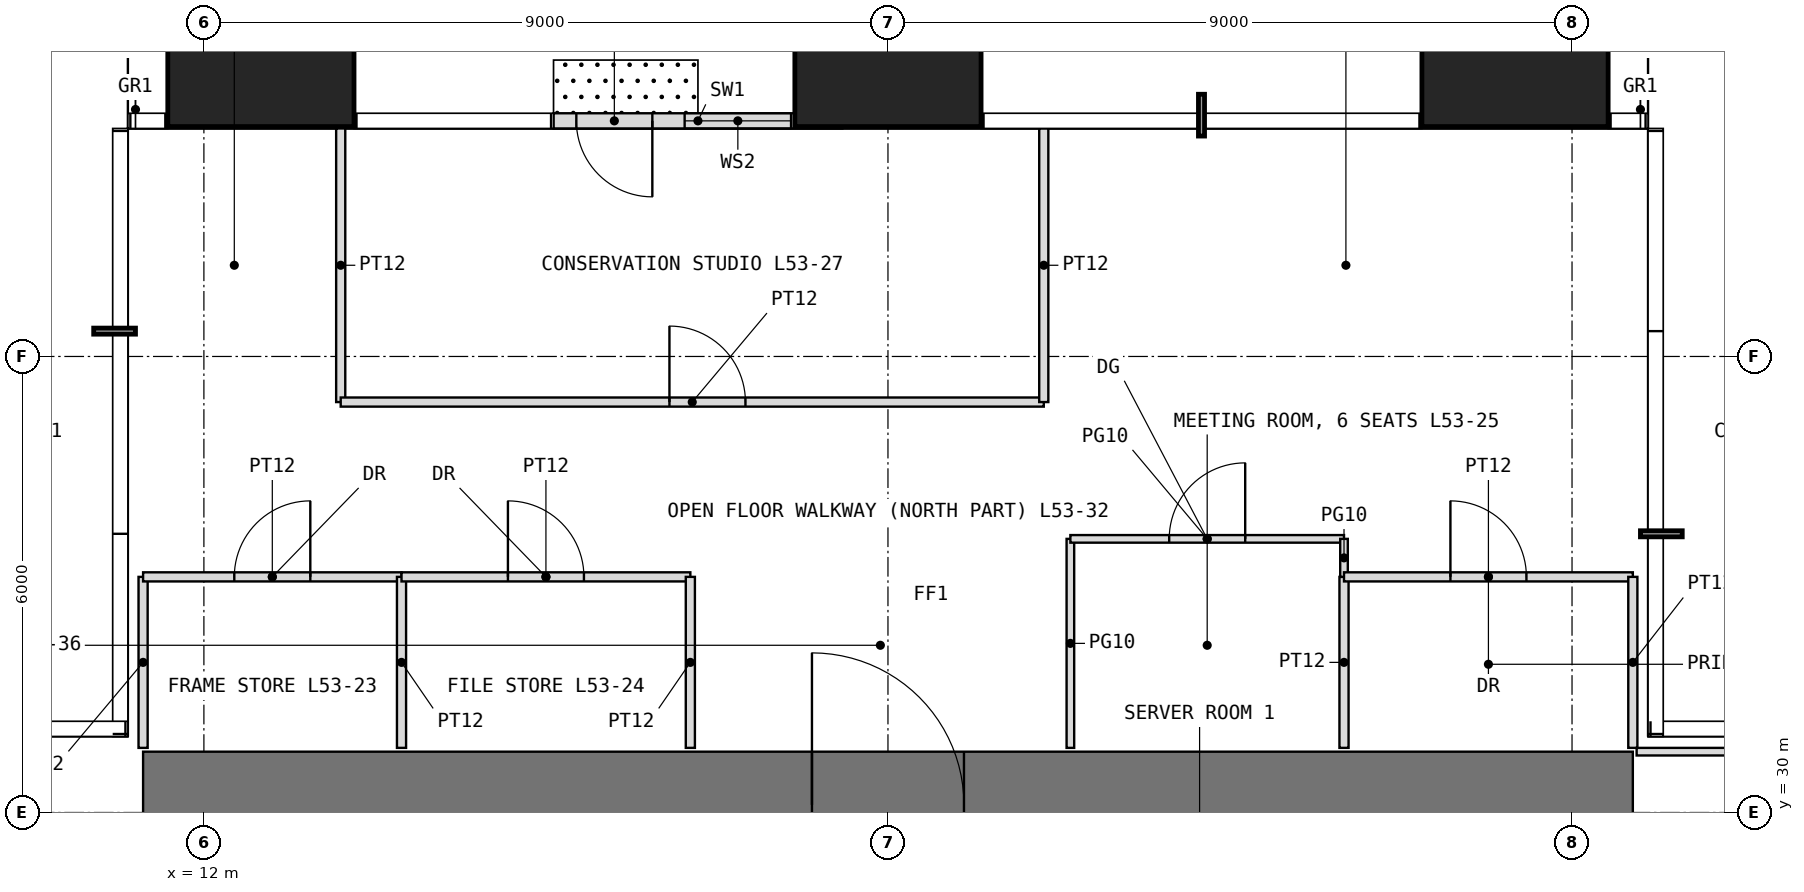
"""IFC4 building model, lengths in metres.
Left out: names, types, materials, properties, quantities, classifications, styles, units other than length and angle.
Written with IfcOpenShell. Run it as: python <this file> out.ifc"""

import sys

from ifc_helpers import new_model, si_unit, direction, frame, frame_2d, origin, origin_2d, place, context, subcontext, project, spatial, rectangle, extrude, element, fill, save


model = new_model("IFC4")
c1 = context("Model", 3, precision=1e-05, world=origin(), true_north=direction((0.0, 1.0)))
c2 = subcontext(c1, "Body", "Model", "MODEL_VIEW")
j1 = project(units=[si_unit("LENGTHUNIT", "METRE"), si_unit("PLANEANGLEUNIT", "RADIAN")], contexts=[c1])
p1 = place(None, origin())
s1 = spatial("IfcSite", under=j1, at=p1, CompositionType="ELEMENT")
p2 = place(p1, origin())
s2 = spatial("IfcBuilding", under=s1, at=p2, CompositionType="ELEMENT")
p3 = place(p2, frame((0.0, 0.0, 222.5)))
s3 = spatial("IfcBuildingStorey", under=s2, at=p3, CompositionType="ELEMENT", Elevation=222.5)
for number, where, z_axis, x_axis in (
    (1, (12.75, 40.25, 0.0), (0.0, 0.0, 1.0), (1.0, 0.0, 0.0)),
    (2, (21.0, 40.25, 0.0), (0.0, 0.0, 1.0), (1.0, 0.0, 0.0)),
    (3, (29.25, 40.25, 0.0), (0.0, 0.0, 1.0), (1.0, 0.0, 0.0)),
):
    element("IfcColumn", number, at=place(p3, frame(where, z_axis=z_axis, x_axis=x_axis)), inside=s3, PredefinedType="COLUMN", context=c2, shape_type="SweptSolid", body=[
        extrude(rectangle(XDim=2.45, YDim=2.45, at=origin_2d()), origin(), (0.0, 0.0, 1.0), 4.0),
    ])
p4 = place(p3, frame((20.4, 39.1, 0.0), z_axis=(0.0, 0.0, 1.0), x_axis=(-1.0, 0.0, 0.0)))
e4 = element("IfcWall", 4, at=p4, inside=s3, PredefinedType="USERDEFINED", context=c2, shape_type="SweptSolid", body=[
    extrude(rectangle(XDim=3.8, YDim=0.2, at=frame_2d((1.9, 0.0))), origin(), (0.0, 0.0, 1.0), 3.75),
])
p5 = place(p4, frame((2.5, 0.0, 0.0)))
e5 = element("IfcOpeningElement", 5, at=p5, cuts=e4, PredefinedType="OPENING", context=c2, shape_type="SweptSolid", body=[
    extrude(rectangle(XDim=1.0, YDim=2.4, at=frame_2d((0.5, 1.2))), frame((0.0, 0.11, 0.0), z_axis=(0.0, -1.0, 0.0), x_axis=(1.0, 0.0, 0.0)), (0.0, 0.0, 1.0), 0.22),
])
p6 = place(p4, frame((0.675, 0.0, 0.3)))
e6 = element("IfcOpeningElement", 6, at=p6, cuts=e4, PredefinedType="OPENING", context=c2, shape_type="SweptSolid", body=[
    extrude(rectangle(XDim=1.4, YDim=2.7, at=frame_2d((0.7, 1.35))), frame((0.0, 0.11, 0.0), z_axis=(0.0, -1.0, 0.0), x_axis=(1.0, 0.0, 0.0)), (0.0, 0.0, 1.0), 0.22),
])
p7 = place(p3, frame((11.2, 30.1, -0.05), z_axis=(0.0, 0.0, 1.0), x_axis=(1.0, 0.0, 0.0)))
e7 = element("IfcWall", 7, at=p7, inside=s3, PredefinedType="SHEAR", context=c2, shape_type="SweptSolid", body=[
    extrude(rectangle(XDim=19.6, YDim=1.4, at=frame_2d((9.8, 0.0))), origin(), (0.0, 0.0, 1.0), 4.0),
])
p8 = place(p7, frame((8.8, 0.0, 0.05)))
e8 = element("IfcOpeningElement", 8, at=p8, cuts=e7, PredefinedType="OPENING", context=c2, shape_type="SweptSolid", body=[
    extrude(rectangle(XDim=2.0, YDim=2.2, at=frame_2d((1.0, 1.1))), frame((0.0, 0.71, 0.0), z_axis=(0.0, -1.0, 0.0), x_axis=(1.0, 0.0, 0.0)), (0.0, 0.0, 1.0), 1.42),
])
p9 = place(p3, frame((11.2, 30.85, 0.0), z_axis=(0.0, 0.0, 1.0), x_axis=(0.0, 1.0, 0.0)))
e9 = element("IfcWall", 9, at=p9, inside=s3, PredefinedType="PARTITIONING", context=c2, shape_type="SweptSolid", body=[
    extrude(rectangle(XDim=2.25, YDim=0.12, at=frame_2d((1.125, 0.0))), origin(), (0.0, 0.0, 1.0), 3.75),
])
p10 = place(p3, frame((11.2, 33.1, 0.0), z_axis=(0.0, 0.0, 1.0), x_axis=(1.0, 0.0, 0.0)))
e10 = element("IfcWall", 10, at=p10, inside=s3, PredefinedType="PARTITIONING", context=c2, shape_type="SweptSolid", body=[
    extrude(rectangle(XDim=3.4, YDim=0.12, at=frame_2d((1.7, 0.0))), origin(), (0.0, 0.0, 1.0), 3.75),
])
p11 = place(p10, frame((1.2, 0.0, 0.0)))
e11 = element("IfcOpeningElement", 11, at=p11, cuts=e10, PredefinedType="OPENING", context=c2, shape_type="SweptSolid", body=[
    extrude(rectangle(XDim=1.0, YDim=2.2, at=frame_2d((0.5, 1.1))), frame((0.0, 0.07, 0.0), z_axis=(0.0, -1.0, 0.0), x_axis=(1.0, 0.0, 0.0)), (0.0, 0.0, 1.0), 0.14),
])
p12 = place(p3, frame((13.8, 35.4, 0.0), z_axis=(0.0, 0.0, 1.0), x_axis=(0.0, 1.0, 0.0)))
e12 = element("IfcWall", 12, at=p12, inside=s3, PredefinedType="PARTITIONING", context=c2, shape_type="SweptSolid", body=[
    extrude(rectangle(XDim=3.6, YDim=0.12, at=frame_2d((1.8, 0.0))), origin(), (0.0, 0.0, 1.0), 3.75),
])
p13 = place(p3, frame((13.8, 35.4, 0.0), z_axis=(0.0, 0.0, 1.0), x_axis=(1.0, 0.0, 0.0)))
e13 = element("IfcWall", 13, at=p13, inside=s3, PredefinedType="PARTITIONING", context=c2, shape_type="SweptSolid", body=[
    extrude(rectangle(XDim=9.25, YDim=0.12, at=frame_2d((4.625, 0.0))), origin(), (0.0, 0.0, 1.0), 3.75),
])
p14 = place(p13, frame((4.325, 0.0, 0.0)))
e14 = element("IfcOpeningElement", 14, at=p14, cuts=e13, PredefinedType="OPENING", context=c2, shape_type="SweptSolid", body=[
    extrude(rectangle(XDim=1.0, YDim=2.2, at=frame_2d((0.5, 1.1))), frame((0.0, 0.07, 0.0), z_axis=(0.0, -1.0, 0.0), x_axis=(1.0, 0.0, 0.0)), (0.0, 0.0, 1.0), 0.14),
])
p15 = place(p3, frame((14.6, 30.85, 0.0), z_axis=(0.0, 0.0, 1.0), x_axis=(0.0, 1.0, 0.0)))
e15 = element("IfcWall", 15, at=p15, inside=s3, PredefinedType="PARTITIONING", context=c2, shape_type="SweptSolid", body=[
    extrude(rectangle(XDim=2.25, YDim=0.12, at=frame_2d((1.125, 0.0))), origin(), (0.0, 0.0, 1.0), 3.75),
])
p16 = place(p3, frame((14.6, 33.1, 0.0), z_axis=(0.0, 0.0, 1.0), x_axis=(1.0, 0.0, 0.0)))
e16 = element("IfcWall", 16, at=p16, inside=s3, PredefinedType="PARTITIONING", context=c2, shape_type="SweptSolid", body=[
    extrude(rectangle(XDim=3.8, YDim=0.12, at=frame_2d((1.9, 0.0))), origin(), (0.0, 0.0, 1.0), 3.75),
])
p17 = place(p16, frame((1.4, 0.0, 0.0)))
e17 = element("IfcOpeningElement", 17, at=p17, cuts=e16, PredefinedType="OPENING", context=c2, shape_type="SweptSolid", body=[
    extrude(rectangle(XDim=1.0, YDim=2.2, at=frame_2d((0.5, 1.1))), frame((0.0, 0.07, 0.0), z_axis=(0.0, -1.0, 0.0), x_axis=(1.0, 0.0, 0.0)), (0.0, 0.0, 1.0), 0.14),
])
p18 = place(p3, frame((18.4, 30.85, 0.0), z_axis=(0.0, 0.0, 1.0), x_axis=(0.0, 1.0, 0.0)))
e18 = element("IfcWall", 18, at=p18, inside=s3, PredefinedType="PARTITIONING", context=c2, shape_type="SweptSolid", body=[
    extrude(rectangle(XDim=2.25, YDim=0.12, at=frame_2d((1.125, 0.0))), origin(), (0.0, 0.0, 1.0), 3.75),
])
p19 = place(p3, frame((23.05, 35.4, 0.0), z_axis=(0.0, 0.0, 1.0), x_axis=(0.0, 1.0, 0.0)))
e19 = element("IfcWall", 19, at=p19, inside=s3, PredefinedType="PARTITIONING", context=c2, shape_type="SweptSolid", body=[
    extrude(rectangle(XDim=3.6, YDim=0.12, at=frame_2d((1.8, 0.0))), origin(), (0.0, 0.0, 1.0), 3.75),
])
p20 = place(p3, frame((23.4, 30.85, 0.0), z_axis=(0.0, 0.0, 1.0), x_axis=(0.0, 1.0, 0.0)))
e20 = element("IfcWall", 20, at=p20, inside=s3, PredefinedType="PARTITIONING", context=c2, shape_type="SweptSolid", body=[
    extrude(rectangle(XDim=2.75, YDim=0.1, at=frame_2d((1.375, 0.0))), origin(), (0.0, 0.0, 1.0), 3.75),
])
p21 = place(p3, frame((23.4, 33.6, 0.0), z_axis=(0.0, 0.0, 1.0), x_axis=(1.0, 0.0, 0.0)))
e21 = element("IfcWall", 21, at=p21, inside=s3, PredefinedType="PARTITIONING", context=c2, shape_type="SweptSolid", body=[
    extrude(rectangle(XDim=3.6, YDim=0.1, at=frame_2d((1.8, 0.0))), origin(), (0.0, 0.0, 1.0), 3.75),
])
p22 = place(p21, frame((1.3, 0.0, 0.0)))
e22 = element("IfcOpeningElement", 22, at=p22, cuts=e21, PredefinedType="OPENING", context=c2, shape_type="SweptSolid", body=[
    extrude(rectangle(XDim=1.0, YDim=2.4, at=frame_2d((0.5, 1.2))), frame((0.0, 0.06, 0.0), z_axis=(0.0, -1.0, 0.0), x_axis=(1.0, 0.0, 0.0)), (0.0, 0.0, 1.0), 0.12),
])
p23 = place(p3, frame((27.0, 30.85, 0.0), z_axis=(0.0, 0.0, 1.0), x_axis=(0.0, 1.0, 0.0)))
e23 = element("IfcWall", 23, at=p23, inside=s3, PredefinedType="PARTITIONING", context=c2, shape_type="SweptSolid", body=[
    extrude(rectangle(XDim=2.25, YDim=0.12, at=frame_2d((1.125, 0.0))), origin(), (0.0, 0.0, 1.0), 3.75),
])
p24 = place(p3, frame((27.0, 33.1, 0.0), z_axis=(0.0, 0.0, 1.0), x_axis=(0.0, 1.0, 0.0)))
e24 = element("IfcWall", 24, at=p24, inside=s3, PredefinedType="PARTITIONING", context=c2, shape_type="SweptSolid", body=[
    extrude(rectangle(XDim=0.5, YDim=0.1, at=frame_2d((0.25, 0.0))), origin(), (0.0, 0.0, 1.0), 3.75),
])
p25 = place(p3, frame((27.0, 33.1, 0.0), z_axis=(0.0, 0.0, 1.0), x_axis=(1.0, 0.0, 0.0)))
e25 = element("IfcWall", 25, at=p25, inside=s3, PredefinedType="PARTITIONING", context=c2, shape_type="SweptSolid", body=[
    extrude(rectangle(XDim=3.8, YDim=0.12, at=frame_2d((1.9, 0.0))), origin(), (0.0, 0.0, 1.0), 3.75),
])
p26 = place(p25, frame((1.4, 0.0, 0.0)))
e26 = element("IfcOpeningElement", 26, at=p26, cuts=e25, PredefinedType="OPENING", context=c2, shape_type="SweptSolid", body=[
    extrude(rectangle(XDim=1.0, YDim=2.2, at=frame_2d((0.5, 1.1))), frame((0.0, 0.07, 0.0), z_axis=(0.0, -1.0, 0.0), x_axis=(1.0, 0.0, 0.0)), (0.0, 0.0, 1.0), 0.14),
])
p27 = place(p3, frame((30.8, 30.85, 0.0), z_axis=(0.0, 0.0, 1.0), x_axis=(0.0, 1.0, 0.0)))
e27 = element("IfcWall", 27, at=p27, inside=s3, PredefinedType="PARTITIONING", context=c2, shape_type="SweptSolid", body=[
    extrude(rectangle(XDim=2.25, YDim=0.12, at=frame_2d((1.125, 0.0))), origin(), (0.0, 0.0, 1.0), 3.75),
])
p28 = place(p3, frame((30.85, 30.8, 0.0), z_axis=(0.0, 0.0, 1.0), x_axis=(1.0, 0.0, 0.0)))
e28 = element("IfcWall", 28, at=p28, inside=s3, PredefinedType="PARTITIONING", context=c2, shape_type="SweptSolid", body=[
    extrude(rectangle(XDim=4.95, YDim=0.1, at=frame_2d((2.475, 0.0))), origin(), (0.0, 0.0, 1.0), 3.75),
])
p29 = place(p5, origin())
e29 = element("IfcDoor", 29, at=p29, inside=s3, OperationType="SINGLE_SWING_LEFT", PredefinedType="DOOR", context=c2, shape_type="SweptSolid", body=[
    extrude(rectangle(XDim=1.0, YDim=2.4, at=frame_2d((0.5, 1.2))), frame((0.0, 0.025, 0.0), z_axis=(0.0, -1.0, 0.0), x_axis=(1.0, 0.0, 0.0)), (0.0, 0.0, 1.0), 0.05),
])
fill(e5, e29)
p30 = place(p6, origin())
e30 = element("IfcWindow", 30, at=p30, inside=s3, PartitioningType="SINGLE_PANEL", PredefinedType="WINDOW", context=c2, shape_type="SweptSolid", body=[
    extrude(rectangle(XDim=1.4, YDim=2.7, at=frame_2d((0.7, 1.35))), frame((0.0, 0.03, 0.0), z_axis=(0.0, -1.0, 0.0), x_axis=(1.0, 0.0, 0.0)), (0.0, 0.0, 1.0), 0.06),
])
fill(e6, e30)
p31 = place(p8, origin())
e31 = element("IfcDoor", 31, at=p31, inside=s3, OperationType="DOUBLE_DOOR_SINGLE_SWING", PredefinedType="DOOR", context=c2, shape_type="SweptSolid", body=[
    extrude(rectangle(XDim=2.0, YDim=2.2, at=frame_2d((1.0, 1.1))), frame((0.0, 0.025, 0.0), z_axis=(0.0, -1.0, 0.0), x_axis=(1.0, 0.0, 0.0)), (0.0, 0.0, 1.0), 0.05),
])
fill(e8, e31)
p32 = place(p11, origin())
e32 = element("IfcDoor", 32, at=p32, inside=s3, OperationType="SINGLE_SWING_RIGHT", PredefinedType="DOOR", context=c2, shape_type="SweptSolid", body=[
    extrude(rectangle(XDim=1.0, YDim=2.2, at=frame_2d((0.5, 1.1))), frame((0.0, 0.025, 0.0), z_axis=(0.0, -1.0, 0.0), x_axis=(1.0, 0.0, 0.0)), (0.0, 0.0, 1.0), 0.05),
])
fill(e11, e32)
p33 = place(p17, origin())
e33 = element("IfcDoor", 33, at=p33, inside=s3, OperationType="SINGLE_SWING_LEFT", PredefinedType="DOOR", context=c2, shape_type="SweptSolid", body=[
    extrude(rectangle(XDim=1.0, YDim=2.2, at=frame_2d((0.5, 1.1))), frame((0.0, 0.025, 0.0), z_axis=(0.0, -1.0, 0.0), x_axis=(1.0, 0.0, 0.0)), (0.0, 0.0, 1.0), 0.05),
])
fill(e17, e33)
p34 = place(p22, origin())
e34 = element("IfcDoor", 34, at=p34, inside=s3, OperationType="SINGLE_SWING_RIGHT", PredefinedType="DOOR", context=c2, shape_type="SweptSolid", body=[
    extrude(rectangle(XDim=1.0, YDim=2.4, at=frame_2d((0.5, 1.2))), frame((0.0, 0.025, 0.0), z_axis=(0.0, -1.0, 0.0), x_axis=(1.0, 0.0, 0.0)), (0.0, 0.0, 1.0), 0.05),
])
fill(e22, e34)
p35 = place(p26, origin())
e35 = element("IfcDoor", 35, at=p35, inside=s3, OperationType="SINGLE_SWING_LEFT", PredefinedType="DOOR", context=c2, shape_type="SweptSolid", body=[
    extrude(rectangle(XDim=1.0, YDim=2.2, at=frame_2d((0.5, 1.1))), frame((0.0, 0.025, 0.0), z_axis=(0.0, -1.0, 0.0), x_axis=(1.0, 0.0, 0.0)), (0.0, 0.0, 1.0), 0.05),
])
fill(e26, e35)
p36 = place(p14, origin())
e36 = element("IfcDoor", 36, at=p36, inside=s3, OperationType="SINGLE_SWING_LEFT", PredefinedType="DOOR", context=c2, shape_type="SweptSolid", body=[
    extrude(rectangle(XDim=1.0, YDim=2.2, at=frame_2d((0.5, 1.1))), frame((0.0, 0.025, 0.0), z_axis=(0.0, -1.0, 0.0), x_axis=(1.0, 0.0, 0.0)), (0.0, 0.0, 1.0), 0.05),
])
fill(e14, e36)
save(model, sys.argv[1])
